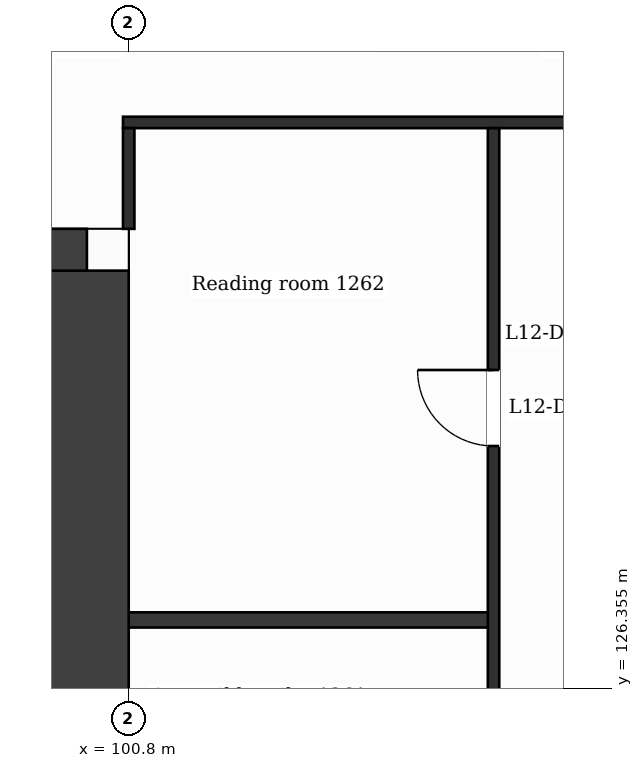
"""IFC4 building model, lengths in metres.
Left out: names, types, materials, properties, quantities, classifications, styles, units other than length and angle.
Written with IfcOpenShell. Run it as: python <this file> out.ifc"""

import sys

from ifc_helpers import new_model, si_unit, direction, frame, frame_2d, origin, place, context, subcontext, project, spatial, rectangle, extrude, element, fill, save


model = new_model("IFC4")
c1 = context("Model", 3, precision=1e-05, world=origin(), true_north=direction((0.0, 1.0)))
c2 = subcontext(c1, "Body", "Model", "MODEL_VIEW")
j1 = project(units=[si_unit("LENGTHUNIT", "METRE"), si_unit("PLANEANGLEUNIT", "RADIAN")], contexts=[c1])
p1 = place(None, origin())
s1 = spatial("IfcSite", under=j1, at=p1, CompositionType="ELEMENT")
p2 = place(p1, origin())
s2 = spatial("IfcBuilding", under=s1, at=p2, CompositionType="ELEMENT")
p3 = place(p2, frame((0.0, 0.0, 60.0)))
s3 = spatial("IfcBuildingStorey", under=s2, at=p3, CompositionType="ELEMENT", Elevation=60.0)
p4 = place(p3, frame((89.112, 131.85, 0.0), z_axis=(0.0, 0.0, 1.0), x_axis=(1.0, 0.0, 0.0)))
e1 = element("IfcWall", 1, at=p4, inside=s3, PredefinedType="SHEAR", context=c2, shape_type="SweptSolid", body=[
    extrude(rectangle(XDim=11.138, YDim=1.1, at=frame_2d((5.569, 0.0))), origin(), (0.0, 0.0, 1.0), 3.5),
])
p5 = place(p4, frame((6.552, 0.0, 0.0)))
e2 = element("IfcOpeningElement", 2, at=p5, cuts=e1, PredefinedType="OPENING", context=c2, shape_type="SweptSolid", body=[
    extrude(rectangle(XDim=1.2, YDim=2.1, at=frame_2d((0.6, 1.05))), frame((0.0, 0.56, 0.0), z_axis=(0.0, -1.0, 0.0), x_axis=(1.0, 0.0, 0.0)), (0.0, 0.0, 1.0), 1.12),
])
p6 = place(p3, frame((100.25, 131.85, 0.0), z_axis=(0.0, 0.0, 1.0), x_axis=(0.0, -1.0, 0.0)))
e3 = element("IfcWall", 3, at=p6, inside=s3, PredefinedType="SHEAR", context=c2, shape_type="SweptSolid", body=[
    extrude(rectangle(XDim=20.9, YDim=1.1, at=frame_2d((10.45, 0.0))), origin(), (0.0, 0.0, 1.0), 3.5),
])
p7 = place(p6, frame((7.7, 0.0, 0.0)))
e4 = element("IfcOpeningElement", 4, at=p7, cuts=e3, PredefinedType="OPENING", context=c2, shape_type="SweptSolid", body=[
    extrude(rectangle(XDim=1.4, YDim=2.1, at=frame_2d((0.7, 1.05))), frame((0.0, 0.56, 0.0), z_axis=(0.0, -1.0, 0.0), x_axis=(1.0, 0.0, 0.0)), (0.0, 0.0, 1.0), 1.12),
])
p8 = place(p3, frame((100.8, 127.255, 0.0), z_axis=(0.0, 0.0, 1.0), x_axis=(1.0, 0.0, 0.0)))
e5 = element("IfcWall", 5, at=p8, inside=s3, PredefinedType="PARTITIONING", context=c2, shape_type="SweptSolid", body=[
    extrude(rectangle(XDim=4.8, YDim=0.2, at=frame_2d((2.4, 0.0))), origin(), (0.0, 0.0, 1.0), 3.18),
])
p9 = place(p3, frame((100.725, 133.8, 0.0), z_axis=(0.0, 0.0, 1.0), x_axis=(1.0, 0.0, 0.0)))
e6 = element("IfcWall", 6, at=p9, inside=s3, PredefinedType="PARTITIONING", context=c2, shape_type="SweptSolid", body=[
    extrude(rectangle(XDim=25.35, YDim=0.15, at=frame_2d((12.675, 0.0))), origin(), (0.0, 0.0, 1.0), 3.18),
])
p10 = place(p3, frame((100.8, 132.4, 0.0), z_axis=(0.0, 0.0, 1.0), x_axis=(0.0, 1.0, 0.0)))
e7 = element("IfcWall", 7, at=p10, inside=s3, PredefinedType="PARTITIONING", context=c2, shape_type="SweptSolid", body=[
    extrude(rectangle(XDim=1.325, YDim=0.15, at=frame_2d((0.663, 0.0))), origin(), (0.0, 0.0, 1.0), 3.18),
])
p11 = place(p3, frame((105.6, 124.525, 0.0), z_axis=(0.0, 0.0, 1.0), x_axis=(0.0, 1.0, 0.0)))
e8 = element("IfcWall", 8, at=p11, inside=s3, PredefinedType="PARTITIONING", context=c2, shape_type="SweptSolid", body=[
    extrude(rectangle(XDim=9.2, YDim=0.15, at=frame_2d((4.6, 0.0))), origin(), (0.0, 0.0, 1.0), 3.18),
])
p12 = place(p11, frame((5.018, 0.0, 0.0)))
e9 = element("IfcOpeningElement", 9, at=p12, cuts=e8, PredefinedType="OPENING", context=c2, shape_type="SweptSolid", body=[
    extrude(rectangle(XDim=1.0, YDim=2.1, at=frame_2d((0.5, 1.05))), frame((0.0, 0.085, 0.0), z_axis=(0.0, -1.0, 0.0), x_axis=(1.0, 0.0, 0.0)), (0.0, 0.0, 1.0), 0.17),
])
p13 = place(p12, origin())
e10 = element("IfcDoor", 10, at=p13, inside=s3, OperationType="SINGLE_SWING_RIGHT", PredefinedType="DOOR", context=c2, shape_type="SweptSolid", body=[
    extrude(rectangle(XDim=1.0, YDim=2.1, at=frame_2d((0.5, 1.05))), frame((0.0, 0.025, 0.0), z_axis=(0.0, -1.0, 0.0), x_axis=(1.0, 0.0, 0.0)), (0.0, 0.0, 1.0), 0.05),
])
fill(e9, e10)
save(model, sys.argv[1])
